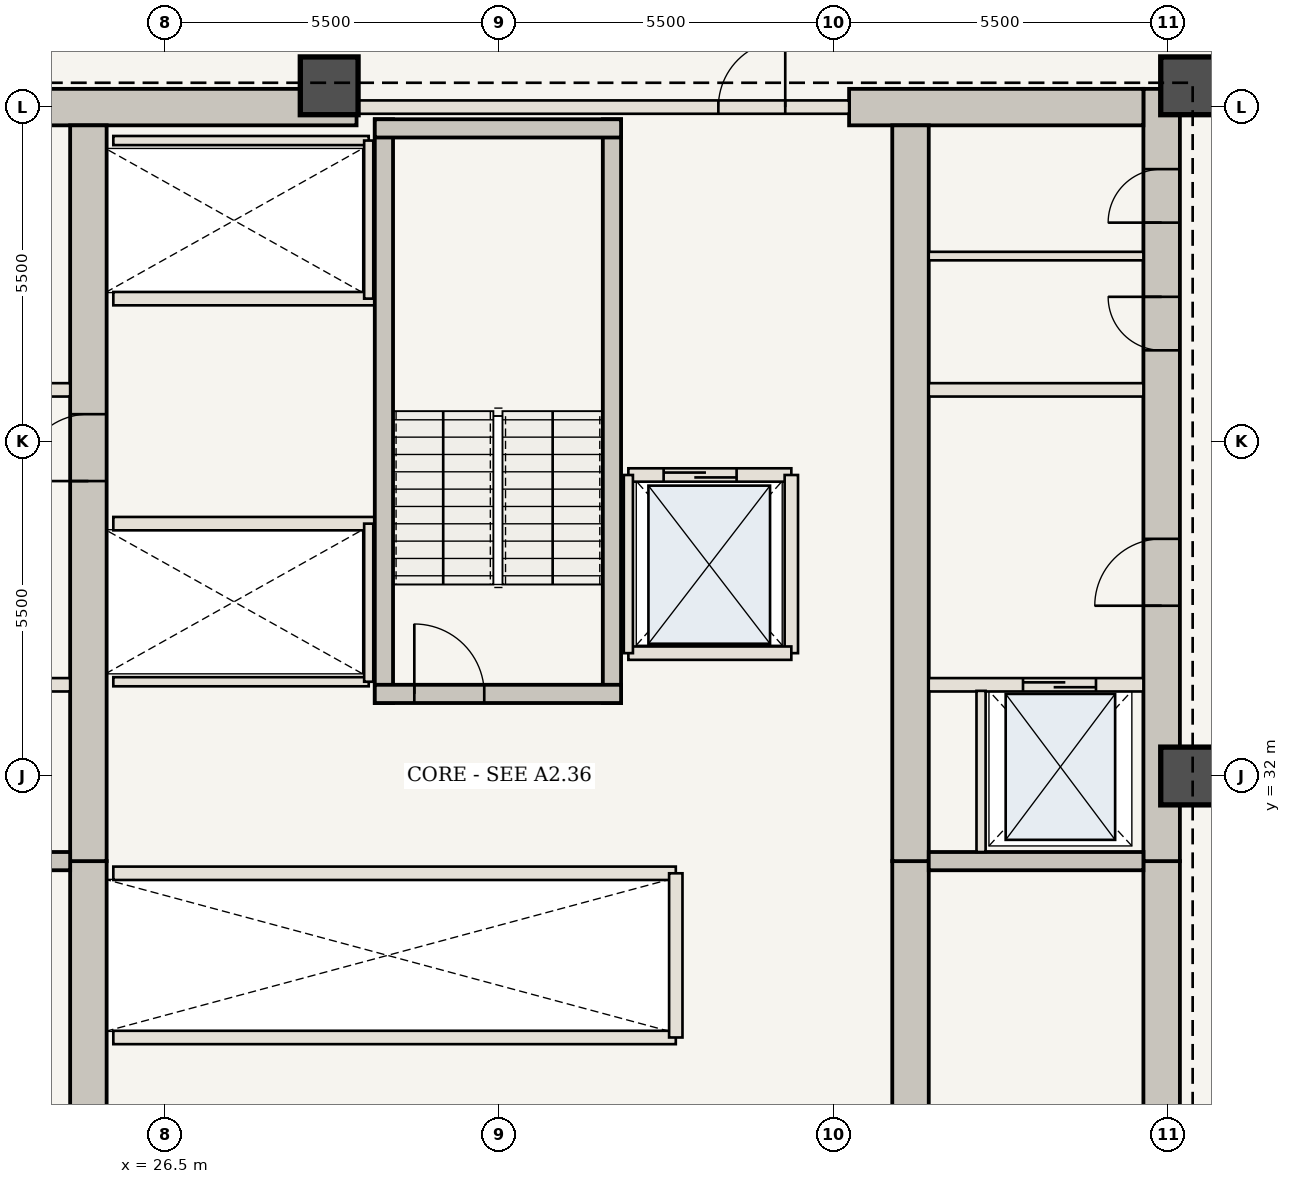
"""IFC4 building model, lengths in metres.
Left out: names, types, materials, properties, quantities, classifications, styles, units other than length and angle.
Written with IfcOpenShell. Run it as: python <this file> out.ifc"""

import sys

from ifc_helpers import new_model, si_unit, direction, frame, frame_2d, origin, origin_2d, place, context, subcontext, project, spatial, rectangle, extrude, element, fill, save


model = new_model("IFC4")
c1 = context("Model", 3, precision=1e-05, world=origin(), true_north=direction((0.0, 1.0)))
c2 = subcontext(c1, "Body", "Model", "MODEL_VIEW")
j1 = project(units=[si_unit("LENGTHUNIT", "METRE"), si_unit("PLANEANGLEUNIT", "RADIAN")], contexts=[c1])
p1 = place(None, origin())
s1 = spatial("IfcSite", under=j1, at=p1, CompositionType="ELEMENT")
p2 = place(p1, origin())
s2 = spatial("IfcBuilding", under=s1, at=p2, CompositionType="ELEMENT")
p3 = place(p2, frame((0.0, 0.0, 160.65)))
s3 = spatial("IfcBuildingStorey", under=s2, at=p3, CompositionType="ELEMENT", Elevation=160.65)
p4 = place(p3, frame((42.89, 20.65, 0.0), z_axis=(0.0, 0.0, 1.0), x_axis=(0.0, 1.0, 0.0)))
e1 = element("IfcWall", 1, at=p4, inside=s3, PredefinedType="SHEAR", context=c2, shape_type="SweptSolid", body=[
    extrude(rectangle(XDim=9.95, YDim=0.6, at=frame_2d((4.975, 0.0))), origin(), (0.0, 0.0, 1.0), 3.85),
])
p5 = place(p4, frame((1.1, 0.0, 0.0)))
e2 = element("IfcOpeningElement", 2, at=p5, cuts=e1, PredefinedType="OPENING", context=c2, shape_type="SweptSolid", body=[
    extrude(rectangle(XDim=1.15, YDim=2.15, at=frame_2d((0.575, 1.075))), frame((0.0, 0.31, 0.0), z_axis=(0.0, -1.0, 0.0), x_axis=(1.0, 0.0, 0.0)), (0.0, 0.0, 1.0), 0.62),
])
p6 = place(p3, frame((42.89, 30.6, 0.0), z_axis=(0.0, 0.0, 1.0), x_axis=(0.0, 1.0, 0.0)))
e3 = element("IfcWall", 3, at=p6, inside=s3, PredefinedType="SHEAR", context=c2, shape_type="SweptSolid", body=[
    extrude(rectangle(XDim=12.7, YDim=0.6, at=frame_2d((6.35, 0.0))), origin(), (0.0, 0.0, 1.0), 3.85),
])
p7 = place(p6, frame((4.2, 0.0, 0.0)))
e4 = element("IfcOpeningElement", 4, at=p7, cuts=e3, PredefinedType="OPENING", context=c2, shape_type="SweptSolid", body=[
    extrude(rectangle(XDim=1.1, YDim=2.15, at=frame_2d((0.55, 1.075))), frame((0.0, 0.31, 0.0), z_axis=(0.0, -1.0, 0.0), x_axis=(1.0, 0.0, 0.0)), (0.0, 0.0, 1.0), 0.62),
])
p8 = place(p6, frame((8.4, 0.0, 0.0)))
e5 = element("IfcOpeningElement", 5, at=p8, cuts=e3, PredefinedType="OPENING", context=c2, shape_type="SweptSolid", body=[
    extrude(rectangle(XDim=0.88, YDim=2.1, at=frame_2d((0.44, 1.05))), frame((0.0, 0.31, 0.0), z_axis=(0.0, -1.0, 0.0), x_axis=(1.0, 0.0, 0.0)), (0.0, 0.0, 1.0), 0.62),
])
p9 = place(p6, frame((10.5, 0.0, 0.0)))
e6 = element("IfcOpeningElement", 6, at=p9, cuts=e3, PredefinedType="OPENING", context=c2, shape_type="SweptSolid", body=[
    extrude(rectangle(XDim=0.88, YDim=2.1, at=frame_2d((0.44, 1.05))), frame((0.0, 0.31, 0.0), z_axis=(0.0, -1.0, 0.0), x_axis=(1.0, 0.0, 0.0)), (0.0, 0.0, 1.0), 0.62),
])
p10 = place(p3, frame((21.41, 43.0, 0.0), z_axis=(0.0, 0.0, 1.0), x_axis=(1.0, 0.0, 0.0)))
e7 = element("IfcWall", 7, at=p10, inside=s3, PredefinedType="SHEAR", context=c2, shape_type="SweptSolid", body=[
    extrude(rectangle(XDim=8.24, YDim=0.6, at=frame_2d((4.12, 0.0))), origin(), (0.0, 0.0, 1.0), 3.85),
])
p11 = place(p3, frame((37.75, 43.0, 0.0), z_axis=(0.0, 0.0, 1.0), x_axis=(1.0, 0.0, 0.0)))
e8 = element("IfcWall", 8, at=p11, inside=s3, PredefinedType="SHEAR", context=c2, shape_type="SweptSolid", body=[
    extrude(rectangle(XDim=4.84, YDim=0.6, at=frame_2d((2.42, 0.0))), origin(), (0.0, 0.0, 1.0), 3.85),
])
p12 = place(p3, frame((25.24, 21.25, 0.0), z_axis=(0.0, 0.0, 1.0), x_axis=(0.0, 1.0, 0.0)))
e9 = element("IfcWall", 9, at=p12, inside=s3, PredefinedType="SHEAR", context=c2, shape_type="SweptSolid", body=[
    extrude(rectangle(XDim=9.35, YDim=0.6, at=frame_2d((4.675, 0.0))), origin(), (0.0, 0.0, 1.0), 3.85),
])
p13 = place(p3, frame((25.24, 30.6, 0.0), z_axis=(0.0, 0.0, 1.0), x_axis=(0.0, 1.0, 0.0)))
e10 = element("IfcWall", 10, at=p13, inside=s3, PredefinedType="SHEAR", context=c2, shape_type="SweptSolid", body=[
    extrude(rectangle(XDim=12.1, YDim=0.6, at=frame_2d((6.05, 0.0))), origin(), (0.0, 0.0, 1.0), 3.85),
])
p14 = place(p13, frame((6.25, 0.0, 0.0)))
e11 = element("IfcOpeningElement", 11, at=p14, cuts=e10, PredefinedType="OPENING", context=c2, shape_type="SweptSolid", body=[
    extrude(rectangle(XDim=1.1, YDim=2.15, at=frame_2d((0.55, 1.075))), frame((0.0, 0.31, 0.0), z_axis=(0.0, -1.0, 0.0), x_axis=(1.0, 0.0, 0.0)), (0.0, 0.0, 1.0), 0.62),
])
p15 = place(p3, frame((38.76, 21.25, 0.0), z_axis=(0.0, 0.0, 1.0), x_axis=(0.0, 1.0, 0.0)))
e12 = element("IfcWall", 12, at=p15, inside=s3, PredefinedType="SHEAR", context=c2, shape_type="SweptSolid", body=[
    extrude(rectangle(XDim=9.35, YDim=0.6, at=frame_2d((4.675, 0.0))), origin(), (0.0, 0.0, 1.0), 3.85),
])
p16 = place(p3, frame((38.76, 30.6, 0.0), z_axis=(0.0, 0.0, 1.0), x_axis=(0.0, 1.0, 0.0)))
e13 = element("IfcWall", 13, at=p16, inside=s3, PredefinedType="SHEAR", context=c2, shape_type="SweptSolid", body=[
    extrude(rectangle(XDim=12.1, YDim=0.6, at=frame_2d((6.05, 0.0))), origin(), (0.0, 0.0, 1.0), 3.85),
])
for number, where, z_axis, x_axis in (
    (14, (43.35, 32.0, 0.0), (0.0, 0.0, 1.0), (1.0, 0.0, 0.0)),
    (15, (43.35, 43.35, 0.0), (0.0, 0.0, 1.0), (1.0, 0.0, 0.0)),
    (16, (29.2, 43.35, 0.0), (0.0, 0.0, 1.0), (1.0, 0.0, 0.0)),
):
    element("IfcColumn", number, at=place(p3, frame(where, z_axis=z_axis, x_axis=x_axis)), inside=s3, PredefinedType="COLUMN", context=c2, shape_type="SweptSolid", body=[
        extrude(rectangle(XDim=0.95, YDim=0.95, at=origin_2d()), origin(), (0.0, 0.0, 1.0), 3.85),
    ])
for number, where, z_axis, x_axis in (
    (17, (21.41, 30.6, 0.0), (0.0, 0.0, 1.0), (1.0, 0.0, 0.0)),
    (18, (39.06, 30.6, 0.0), (0.0, 0.0, 1.0), (1.0, 0.0, 0.0)),
):
    element("IfcWall", number, at=place(p3, frame(where, z_axis=z_axis, x_axis=x_axis)), inside=s3, PredefinedType="SHEAR", context=c2, shape_type="SweptSolid", body=[
        extrude(rectangle(XDim=3.53, YDim=0.3, at=frame_2d((1.765, 0.0))), origin(), (0.0, 0.0, 1.0), 3.685),
    ])
p17 = place(p3, frame((21.41, 33.5, 0.0), z_axis=(0.0, 0.0, 1.0), x_axis=(1.0, 0.0, 0.0)))
e19 = element("IfcWall", 19, at=p17, inside=s3, PredefinedType="STANDARD", context=c2, shape_type="SweptSolid", body=[
    extrude(rectangle(XDim=3.53, YDim=0.22, at=frame_2d((1.765, 0.0))), origin(), (0.0, 0.0, 1.0), 3.685),
])
p18 = place(p17, frame((0.75, 0.0, 0.0)))
e20 = element("IfcOpeningElement", 20, at=p18, cuts=e19, PredefinedType="OPENING", context=c2, shape_type="SweptSolid", body=[
    extrude(rectangle(XDim=1.2, YDim=2.2, at=frame_2d((0.6, 1.1))), frame((0.0, 0.12, 0.0), z_axis=(0.0, -1.0, 0.0), x_axis=(1.0, 0.0, 0.0)), (0.0, 0.0, 1.0), 0.24),
])
p19 = place(p3, frame((39.06, 33.5, 0.0), z_axis=(0.0, 0.0, 1.0), x_axis=(1.0, 0.0, 0.0)))
e21 = element("IfcWall", 21, at=p19, inside=s3, PredefinedType="STANDARD", context=c2, shape_type="SweptSolid", body=[
    extrude(rectangle(XDim=3.53, YDim=0.22, at=frame_2d((1.765, 0.0))), origin(), (0.0, 0.0, 1.0), 3.685),
])
p20 = place(p19, frame((1.55, 0.0, 0.0)))
e22 = element("IfcOpeningElement", 22, at=p20, cuts=e21, PredefinedType="OPENING", context=c2, shape_type="SweptSolid", body=[
    extrude(rectangle(XDim=1.2, YDim=2.2, at=frame_2d((0.6, 1.1))), frame((0.0, 0.12, 0.0), z_axis=(0.0, -1.0, 0.0), x_axis=(1.0, 0.0, 0.0)), (0.0, 0.0, 1.0), 0.24),
])
p21 = place(p3, frame((39.92, 30.75, 0.0), z_axis=(0.0, 0.0, 1.0), x_axis=(0.0, 1.0, 0.0)))
e23 = element("IfcWall", 23, at=p21, inside=s3, PredefinedType="STANDARD", context=c2, shape_type="SweptSolid", body=[
    extrude(rectangle(XDim=2.65, YDim=0.15, at=frame_2d((1.325, 0.0))), origin(), (0.0, 0.0, 1.0), 3.685),
])
for number, where, z_axis, x_axis in (
    (24, (21.41, 38.35, 0.0), (0.0, 0.0, 1.0), (1.0, 0.0, 0.0)),
    (25, (39.06, 38.35, 0.0), (0.0, 0.0, 1.0), (1.0, 0.0, 0.0)),
):
    element("IfcWall", number, at=place(p3, frame(where, z_axis=z_axis, x_axis=x_axis)), inside=s3, PredefinedType="STANDARD", context=c2, shape_type="SweptSolid", body=[
        extrude(rectangle(XDim=3.53, YDim=0.22, at=frame_2d((1.765, 0.0))), origin(), (0.0, 0.0, 1.0), 3.685),
    ])
p22 = place(p3, frame((39.06, 40.55, 0.0), z_axis=(0.0, 0.0, 1.0), x_axis=(1.0, 0.0, 0.0)))
e26 = element("IfcWall", 26, at=p22, inside=s3, PredefinedType="STANDARD", context=c2, shape_type="SweptSolid", body=[
    extrude(rectangle(XDim=3.53, YDim=0.14, at=frame_2d((1.765, 0.0))), origin(), (0.0, 0.0, 1.0), 3.685),
])
for number, where, z_axis, x_axis in (
    (27, (25.65, 27.7, 0.0), (0.0, 0.0, 1.0), (1.0, 0.0, 0.0)),
    (28, (25.65, 30.4, 0.0), (0.0, 0.0, 1.0), (1.0, 0.0, 0.0)),
):
    element("IfcWall", number, at=place(p3, frame(where, z_axis=z_axis, x_axis=x_axis)), inside=s3, PredefinedType="STANDARD", context=c2, shape_type="SweptSolid", body=[
        extrude(rectangle(XDim=9.25, YDim=0.22, at=frame_2d((4.625, 0.0))), origin(), (0.0, 0.0, 1.0), 3.685),
    ])
p23 = place(p3, frame((34.9, 27.7, 0.0), z_axis=(0.0, 0.0, 1.0), x_axis=(0.0, 1.0, 0.0)))
e29 = element("IfcWall", 29, at=p23, inside=s3, PredefinedType="STANDARD", context=c2, shape_type="SweptSolid", body=[
    extrude(rectangle(XDim=2.7, YDim=0.22, at=frame_2d((1.35, 0.0))), origin(), (0.0, 0.0, 1.0), 3.685),
])
p24 = place(p3, frame((25.65, 36.15, 0.0), z_axis=(0.0, 0.0, 1.0), x_axis=(1.0, 0.0, 0.0)))
e30 = element("IfcWall", 30, at=p24, inside=s3, PredefinedType="STANDARD", context=c2, shape_type="SweptSolid", body=[
    extrude(rectangle(XDim=4.3, YDim=0.22, at=frame_2d((2.15, 0.0))), origin(), (0.0, 0.0, 1.0), 3.685),
])
p25 = place(p3, frame((25.65, 33.55, 0.0), z_axis=(0.0, 0.0, 1.0), x_axis=(1.0, 0.0, 0.0)))
e31 = element("IfcWall", 31, at=p25, inside=s3, PredefinedType="STANDARD", context=c2, shape_type="SweptSolid", body=[
    extrude(rectangle(XDim=4.2, YDim=0.15, at=frame_2d((2.1, 0.0))), origin(), (0.0, 0.0, 1.0), 3.685),
])
p26 = place(p3, frame((29.85, 33.55, 0.0), z_axis=(0.0, 0.0, 1.0), x_axis=(0.0, 1.0, 0.0)))
e32 = element("IfcWall", 32, at=p26, inside=s3, PredefinedType="STANDARD", context=c2, shape_type="SweptSolid", body=[
    extrude(rectangle(XDim=2.6, YDim=0.15, at=frame_2d((1.3, 0.0))), origin(), (0.0, 0.0, 1.0), 3.685),
])
p27 = place(p3, frame((25.65, 39.85, 0.0), z_axis=(0.0, 0.0, 1.0), x_axis=(1.0, 0.0, 0.0)))
e33 = element("IfcWall", 33, at=p27, inside=s3, PredefinedType="STANDARD", context=c2, shape_type="SweptSolid", body=[
    extrude(rectangle(XDim=4.3, YDim=0.22, at=frame_2d((2.15, 0.0))), origin(), (0.0, 0.0, 1.0), 3.685),
])
p28 = place(p3, frame((25.65, 42.45, 0.0), z_axis=(0.0, 0.0, 1.0), x_axis=(1.0, 0.0, 0.0)))
e34 = element("IfcWall", 34, at=p28, inside=s3, PredefinedType="STANDARD", context=c2, shape_type="SweptSolid", body=[
    extrude(rectangle(XDim=4.2, YDim=0.15, at=frame_2d((2.1, 0.0))), origin(), (0.0, 0.0, 1.0), 3.685),
])
p29 = place(p3, frame((29.85, 39.85, 0.0), z_axis=(0.0, 0.0, 1.0), x_axis=(0.0, 1.0, 0.0)))
e35 = element("IfcWall", 35, at=p29, inside=s3, PredefinedType="STANDARD", context=c2, shape_type="SweptSolid", body=[
    extrude(rectangle(XDim=2.6, YDim=0.15, at=frame_2d((1.3, 0.0))), origin(), (0.0, 0.0, 1.0), 3.685),
])
for number, where, z_axis, x_axis in (
    (36, (30.1, 33.2, 0.0), (0.0, 0.0, 1.0), (0.0, 1.0, 0.0)),
    (37, (33.85, 33.2, 0.0), (0.0, 0.0, 1.0), (0.0, 1.0, 0.0)),
):
    element("IfcWall", number, at=place(p3, frame(where, z_axis=z_axis, x_axis=x_axis)), inside=s3, PredefinedType="SHEAR", context=c2, shape_type="SweptSolid", body=[
        extrude(rectangle(XDim=9.6, YDim=0.3, at=frame_2d((4.8, 0.0))), origin(), (0.0, 0.0, 1.0), 3.685),
    ])
p30 = place(p3, frame((29.95, 33.35, 0.0), z_axis=(0.0, 0.0, 1.0), x_axis=(1.0, 0.0, 0.0)))
e38 = element("IfcWall", 38, at=p30, inside=s3, PredefinedType="SHEAR", context=c2, shape_type="SweptSolid", body=[
    extrude(rectangle(XDim=4.05, YDim=0.3, at=frame_2d((2.025, 0.0))), origin(), (0.0, 0.0, 1.0), 3.685),
])
p31 = place(p30, frame((0.65, 0.0, 0.0)))
e39 = element("IfcOpeningElement", 39, at=p31, cuts=e38, PredefinedType="OPENING", context=c2, shape_type="SweptSolid", body=[
    extrude(rectangle(XDim=1.15, YDim=2.15, at=frame_2d((0.575, 1.075))), frame((0.0, 0.16, 0.0), z_axis=(0.0, -1.0, 0.0), x_axis=(1.0, 0.0, 0.0)), (0.0, 0.0, 1.0), 0.32),
])
p32 = place(p3, frame((29.95, 42.65, 0.0), z_axis=(0.0, 0.0, 1.0), x_axis=(1.0, 0.0, 0.0)))
e40 = element("IfcWall", 40, at=p32, inside=s3, PredefinedType="SHEAR", context=c2, shape_type="SweptSolid", body=[
    extrude(rectangle(XDim=4.05, YDim=0.3, at=frame_2d((2.025, 0.0))), origin(), (0.0, 0.0, 1.0), 3.685),
])
p33 = place(p3, frame((29.65, 43.0, 0.0), z_axis=(0.0, 0.0, 1.0), x_axis=(1.0, 0.0, 0.0)))
e41 = element("IfcWall", 41, at=p33, inside=s3, PredefinedType="STANDARD", context=c2, shape_type="SweptSolid", body=[
    extrude(rectangle(XDim=8.1, YDim=0.22, at=frame_2d((4.05, 0.0))), origin(), (0.0, 0.0, 1.0), 3.685),
])
p34 = place(p33, frame((5.95, 0.0, 0.0)))
e42 = element("IfcOpeningElement", 42, at=p34, cuts=e41, PredefinedType="OPENING", context=c2, shape_type="SweptSolid", body=[
    extrude(rectangle(XDim=1.1, YDim=2.15, at=frame_2d((0.55, 1.075))), frame((0.0, 0.12, 0.0), z_axis=(0.0, -1.0, 0.0), x_axis=(1.0, 0.0, 0.0)), (0.0, 0.0, 1.0), 0.24),
])
p35 = place(p3, frame((34.12, 36.95, 0.0), z_axis=(0.0, 0.0, 1.0), x_axis=(1.0, 0.0, 0.0)))
e43 = element("IfcWall", 43, at=p35, inside=s3, PredefinedType="STANDARD", context=c2, shape_type="SweptSolid", body=[
    extrude(rectangle(XDim=2.68, YDim=0.22, at=frame_2d((1.34, 0.0))), origin(), (0.0, 0.0, 1.0), 3.685),
])
p36 = place(p35, frame((0.58, 0.0, 0.0)))
e44 = element("IfcOpeningElement", 44, at=p36, cuts=e43, PredefinedType="OPENING", context=c2, shape_type="SweptSolid", body=[
    extrude(rectangle(XDim=1.2, YDim=2.2, at=frame_2d((0.6, 1.1))), frame((0.0, 0.12, 0.0), z_axis=(0.0, -1.0, 0.0), x_axis=(1.0, 0.0, 0.0)), (0.0, 0.0, 1.0), 0.24),
])
p37 = place(p3, frame((36.8, 34.02, 0.0), z_axis=(0.0, 0.0, 1.0), x_axis=(0.0, 1.0, 0.0)))
e45 = element("IfcWall", 45, at=p37, inside=s3, PredefinedType="STANDARD", context=c2, shape_type="SweptSolid", body=[
    extrude(rectangle(XDim=2.93, YDim=0.22, at=frame_2d((1.465, 0.0))), origin(), (0.0, 0.0, 1.0), 3.685),
])
p38 = place(p3, frame((34.12, 34.02, 0.0), z_axis=(0.0, 0.0, 1.0), x_axis=(1.0, 0.0, 0.0)))
e46 = element("IfcWall", 46, at=p38, inside=s3, PredefinedType="STANDARD", context=c2, shape_type="SweptSolid", body=[
    extrude(rectangle(XDim=2.68, YDim=0.22, at=frame_2d((1.34, 0.0))), origin(), (0.0, 0.0, 1.0), 3.685),
])
p39 = place(p3, frame((34.12, 34.02, 0.0), z_axis=(0.0, 0.0, 1.0), x_axis=(0.0, 1.0, 0.0)))
e47 = element("IfcWall", 47, at=p39, inside=s3, PredefinedType="STANDARD", context=c2, shape_type="SweptSolid", body=[
    extrude(rectangle(XDim=2.93, YDim=0.15, at=frame_2d((1.465, 0.0))), origin(), (0.0, 0.0, 1.0), 3.685),
])
p40 = place(p7, origin())
e48 = element("IfcDoor", 48, at=p40, inside=s3, OperationType="SINGLE_SWING_LEFT", PredefinedType="DOOR", context=c2, shape_type="SweptSolid", body=[
    extrude(rectangle(XDim=1.1, YDim=2.15, at=frame_2d((0.55, 1.075))), frame((0.0, 0.025, 0.0), z_axis=(0.0, -1.0, 0.0), x_axis=(1.0, 0.0, 0.0)), (0.0, 0.0, 1.0), 0.05),
])
fill(e4, e48)
p41 = place(p14, origin())
e49 = element("IfcDoor", 49, at=p41, inside=s3, OperationType="SINGLE_SWING_LEFT", PredefinedType="DOOR", context=c2, shape_type="SweptSolid", body=[
    extrude(rectangle(XDim=1.1, YDim=2.15, at=frame_2d((0.55, 1.075))), frame((0.0, 0.025, 0.0), z_axis=(0.0, -1.0, 0.0), x_axis=(1.0, 0.0, 0.0)), (0.0, 0.0, 1.0), 0.05),
])
fill(e11, e49)
p42 = place(p8, origin())
e50 = element("IfcDoor", 50, at=p42, inside=s3, OperationType="SINGLE_SWING_RIGHT", PredefinedType="DOOR", context=c2, shape_type="SweptSolid", body=[
    extrude(rectangle(XDim=0.88, YDim=2.1, at=frame_2d((0.44, 1.05))), frame((0.0, 0.025, 0.0), z_axis=(0.0, -1.0, 0.0), x_axis=(1.0, 0.0, 0.0)), (0.0, 0.0, 1.0), 0.05),
])
fill(e5, e50)
p43 = place(p9, origin())
e51 = element("IfcDoor", 51, at=p43, inside=s3, OperationType="SINGLE_SWING_LEFT", PredefinedType="DOOR", context=c2, shape_type="SweptSolid", body=[
    extrude(rectangle(XDim=0.88, YDim=2.1, at=frame_2d((0.44, 1.05))), frame((0.0, 0.025, 0.0), z_axis=(0.0, -1.0, 0.0), x_axis=(1.0, 0.0, 0.0)), (0.0, 0.0, 1.0), 0.05),
])
fill(e6, e51)
p44 = place(p20, origin())
e52 = element("IfcDoor", 52, at=p44, inside=s3, OperationType="DOUBLE_DOOR_SLIDING", PredefinedType="DOOR", context=c2, shape_type="SweptSolid", body=[
    extrude(rectangle(XDim=1.2, YDim=2.2, at=frame_2d((0.6, 1.1))), frame((0.0, 0.025, 0.0), z_axis=(0.0, -1.0, 0.0), x_axis=(1.0, 0.0, 0.0)), (0.0, 0.0, 1.0), 0.05),
])
fill(e22, e52)
p45 = place(p31, origin())
e53 = element("IfcDoor", 53, at=p45, inside=s3, OperationType="SINGLE_SWING_LEFT", PredefinedType="DOOR", context=c2, shape_type="SweptSolid", body=[
    extrude(rectangle(XDim=1.15, YDim=2.15, at=frame_2d((0.575, 1.075))), frame((0.0, 0.025, 0.0), z_axis=(0.0, -1.0, 0.0), x_axis=(1.0, 0.0, 0.0)), (0.0, 0.0, 1.0), 0.05),
])
fill(e39, e53)
p46 = place(p34, origin())
e54 = element("IfcDoor", 54, at=p46, inside=s3, OperationType="SINGLE_SWING_RIGHT", PredefinedType="DOOR", context=c2, shape_type="SweptSolid", body=[
    extrude(rectangle(XDim=1.1, YDim=2.15, at=frame_2d((0.55, 1.075))), frame((0.0, 0.025, 0.0), z_axis=(0.0, -1.0, 0.0), x_axis=(1.0, 0.0, 0.0)), (0.0, 0.0, 1.0), 0.05),
])
fill(e42, e54)
p47 = place(p36, origin())
e55 = element("IfcDoor", 55, at=p47, inside=s3, OperationType="DOUBLE_DOOR_SLIDING", PredefinedType="DOOR", context=c2, shape_type="SweptSolid", body=[
    extrude(rectangle(XDim=1.2, YDim=2.2, at=frame_2d((0.6, 1.1))), frame((0.0, 0.025, 0.0), z_axis=(0.0, -1.0, 0.0), x_axis=(1.0, 0.0, 0.0)), (0.0, 0.0, 1.0), 0.05),
])
fill(e44, e55)
save(model, sys.argv[1])
